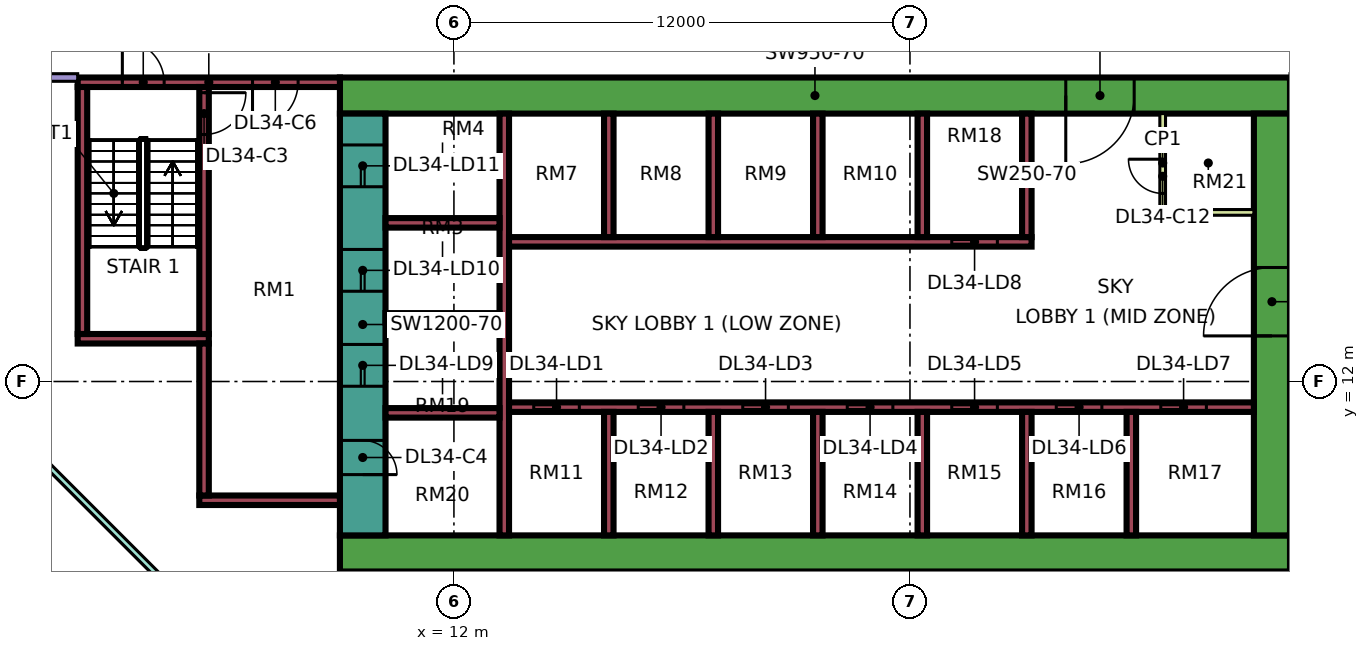
"""IFC4 building model, lengths in metres.
Left out: names, types, materials, properties, quantities, classifications, styles, units other than length and angle.
Written with IfcOpenShell. Run it as: python <this file> out.ifc"""

import sys

from ifc_helpers import new_model, si_unit, direction, frame, frame_2d, origin, place, context, subcontext, project, spatial, rectangle, extrude, element, fill, save


model = new_model("IFC4")
c1 = context("Model", 3, precision=1e-05, world=origin(), true_north=direction((0.0, 1.0)))
c2 = subcontext(c1, "Body", "Model", "MODEL_VIEW")
j1 = project(units=[si_unit("LENGTHUNIT", "METRE"), si_unit("PLANEANGLEUNIT", "RADIAN")], contexts=[c1])
p1 = place(None, origin())
s1 = spatial("IfcSite", under=j1, at=p1, CompositionType="ELEMENT")
p2 = place(p1, origin())
s2 = spatial("IfcBuilding", under=s1, at=p2, CompositionType="ELEMENT")
p3 = place(p2, frame((0.0, 0.0, 146.15)))
s3 = spatial("IfcBuildingStorey", under=s2, at=p3, CompositionType="ELEMENT", Elevation=146.15)
p4 = place(p3, frame((9.0, 7.475, 0.0), z_axis=(0.0, 0.0, 1.0), x_axis=(1.0, 0.0, 0.0)))
e1 = element("IfcWall", 1, at=p4, inside=s3, PredefinedType="SHEAR", context=c2, shape_type="SweptSolid", body=[
    extrude(rectangle(XDim=25.0, YDim=0.95, at=frame_2d((12.5, 0.0))), origin(), (0.0, 0.0, 1.0), 11.25),
])
p5 = place(p3, frame((9.0, 19.525, 0.0), z_axis=(0.0, 0.0, 1.0), x_axis=(1.0, 0.0, 0.0)))
e2 = element("IfcWall", 2, at=p5, inside=s3, PredefinedType="SHEAR", context=c2, shape_type="SweptSolid", body=[
    extrude(rectangle(XDim=25.0, YDim=0.95, at=frame_2d((12.5, 0.0))), origin(), (0.0, 0.0, 1.0), 11.25),
])
p6 = place(p5, frame((19.1, 0.0, 0.0)))
e3 = element("IfcOpeningElement", 3, at=p6, cuts=e2, PredefinedType="OPENING", context=c2, shape_type="SweptSolid", body=[
    extrude(rectangle(XDim=1.8, YDim=2.4, at=frame_2d((0.9, 1.2))), frame((0.0, 0.485, 0.0), z_axis=(0.0, -1.0, 0.0), x_axis=(1.0, 0.0, 0.0)), (0.0, 0.0, 1.0), 0.97),
])
p7 = place(p3, frame((9.6, 7.95, 0.0), z_axis=(0.0, 0.0, 1.0), x_axis=(0.0, 1.0, 0.0)))
e4 = element("IfcWall", 4, at=p7, inside=s3, PredefinedType="SHEAR", context=c2, shape_type="SweptSolid", body=[
    extrude(rectangle(XDim=11.1, YDim=1.2, at=frame_2d((5.55, 0.0))), origin(), (0.0, 0.0, 1.0), 11.25),
])
p8 = place(p7, frame((3.925, 0.0, 0.0)))
e5 = element("IfcOpeningElement", 5, at=p8, cuts=e4, PredefinedType="OPENING", context=c2, shape_type="SweptSolid", body=[
    extrude(rectangle(XDim=1.1, YDim=2.2, at=frame_2d((0.55, 1.1))), frame((0.0, 0.61, 0.0), z_axis=(0.0, -1.0, 0.0), x_axis=(1.0, 0.0, 0.0)), (0.0, 0.0, 1.0), 1.22),
])
p9 = place(p7, frame((6.425, 0.0, 0.0)))
e6 = element("IfcOpeningElement", 6, at=p9, cuts=e4, PredefinedType="OPENING", context=c2, shape_type="SweptSolid", body=[
    extrude(rectangle(XDim=1.1, YDim=2.2, at=frame_2d((0.55, 1.1))), frame((0.0, 0.61, 0.0), z_axis=(0.0, -1.0, 0.0), x_axis=(1.0, 0.0, 0.0)), (0.0, 0.0, 1.0), 1.22),
])
p10 = place(p7, frame((9.175, 0.0, 0.0)))
e7 = element("IfcOpeningElement", 7, at=p10, cuts=e4, PredefinedType="OPENING", context=c2, shape_type="SweptSolid", body=[
    extrude(rectangle(XDim=1.1, YDim=2.2, at=frame_2d((0.55, 1.1))), frame((0.0, 0.61, 0.0), z_axis=(0.0, -1.0, 0.0), x_axis=(1.0, 0.0, 0.0)), (0.0, 0.0, 1.0), 1.22),
])
p11 = place(p7, frame((1.6, 0.0, 0.0)))
e8 = element("IfcOpeningElement", 8, at=p11, cuts=e4, PredefinedType="OPENING", context=c2, shape_type="SweptSolid", body=[
    extrude(rectangle(XDim=0.9, YDim=2.1, at=frame_2d((0.45, 1.05))), frame((0.0, 0.61, 0.0), z_axis=(0.0, -1.0, 0.0), x_axis=(1.0, 0.0, 0.0)), (0.0, 0.0, 1.0), 1.22),
])
p12 = place(p3, frame((33.525, 7.95, 0.0), z_axis=(0.0, 0.0, 1.0), x_axis=(0.0, 1.0, 0.0)))
e9 = element("IfcWall", 9, at=p12, inside=s3, PredefinedType="SHEAR", context=c2, shape_type="SweptSolid", body=[
    extrude(rectangle(XDim=11.1, YDim=0.95, at=frame_2d((5.55, 0.0))), origin(), (0.0, 0.0, 1.0), 11.25),
])
p13 = place(p12, frame((5.25, 0.0, 0.0)))
e10 = element("IfcOpeningElement", 10, at=p13, cuts=e9, PredefinedType="OPENING", context=c2, shape_type="SweptSolid", body=[
    extrude(rectangle(XDim=1.8, YDim=2.4, at=frame_2d((0.9, 1.2))), frame((0.0, 0.485, 0.0), z_axis=(0.0, -1.0, 0.0), x_axis=(1.0, 0.0, 0.0)), (0.0, 0.0, 1.0), 0.97),
])
p14 = place(p3, frame((13.325, 7.95, 0.0), z_axis=(0.0, 0.0, 1.0), x_axis=(0.0, 1.0, 0.0)))
e11 = element("IfcWall", 11, at=p14, inside=s3, PredefinedType="SHEAR", context=c2, shape_type="SweptSolid", body=[
    extrude(rectangle(XDim=11.1, YDim=0.25, at=frame_2d((5.55, 0.0))), origin(), (0.0, 0.0, 1.0), 11.25),
])
p15 = place(p3, frame((13.45, 11.325, 0.0), z_axis=(0.0, 0.0, 1.0), x_axis=(1.0, 0.0, 0.0)))
e12 = element("IfcWall", 12, at=p15, inside=s3, PredefinedType="SHEAR", context=c2, shape_type="SweptSolid", body=[
    extrude(rectangle(XDim=19.6, YDim=0.25, at=frame_2d((9.8, 0.0))), origin(), (0.0, 0.0, 1.0), 11.25),
])
p16 = place(p15, frame((0.65, 0.0, 0.0)))
e13 = element("IfcOpeningElement", 13, at=p16, cuts=e12, PredefinedType="OPENING", context=c2, shape_type="SweptSolid", body=[
    extrude(rectangle(XDim=1.2, YDim=2.2, at=frame_2d((0.6, 1.1))), frame((0.0, 0.135, 0.0), z_axis=(0.0, -1.0, 0.0), x_axis=(1.0, 0.0, 0.0)), (0.0, 0.0, 1.0), 0.27),
])
p17 = place(p15, frame((3.4, 0.0, 0.0)))
e14 = element("IfcOpeningElement", 14, at=p17, cuts=e12, PredefinedType="OPENING", context=c2, shape_type="SweptSolid", body=[
    extrude(rectangle(XDim=1.2, YDim=2.2, at=frame_2d((0.6, 1.1))), frame((0.0, 0.135, 0.0), z_axis=(0.0, -1.0, 0.0), x_axis=(1.0, 0.0, 0.0)), (0.0, 0.0, 1.0), 0.27),
])
p18 = place(p15, frame((6.15, 0.0, 0.0)))
e15 = element("IfcOpeningElement", 15, at=p18, cuts=e12, PredefinedType="OPENING", context=c2, shape_type="SweptSolid", body=[
    extrude(rectangle(XDim=1.2, YDim=2.2, at=frame_2d((0.6, 1.1))), frame((0.0, 0.135, 0.0), z_axis=(0.0, -1.0, 0.0), x_axis=(1.0, 0.0, 0.0)), (0.0, 0.0, 1.0), 0.27),
])
p19 = place(p15, frame((8.9, 0.0, 0.0)))
e16 = element("IfcOpeningElement", 16, at=p19, cuts=e12, PredefinedType="OPENING", context=c2, shape_type="SweptSolid", body=[
    extrude(rectangle(XDim=1.2, YDim=2.2, at=frame_2d((0.6, 1.1))), frame((0.0, 0.135, 0.0), z_axis=(0.0, -1.0, 0.0), x_axis=(1.0, 0.0, 0.0)), (0.0, 0.0, 1.0), 0.27),
])
p20 = place(p15, frame((11.65, 0.0, 0.0)))
e17 = element("IfcOpeningElement", 17, at=p20, cuts=e12, PredefinedType="OPENING", context=c2, shape_type="SweptSolid", body=[
    extrude(rectangle(XDim=1.2, YDim=2.2, at=frame_2d((0.6, 1.1))), frame((0.0, 0.135, 0.0), z_axis=(0.0, -1.0, 0.0), x_axis=(1.0, 0.0, 0.0)), (0.0, 0.0, 1.0), 0.27),
])
p21 = place(p15, frame((14.4, 0.0, 0.0)))
e18 = element("IfcOpeningElement", 18, at=p21, cuts=e12, PredefinedType="OPENING", context=c2, shape_type="SweptSolid", body=[
    extrude(rectangle(XDim=1.2, YDim=2.2, at=frame_2d((0.6, 1.1))), frame((0.0, 0.135, 0.0), z_axis=(0.0, -1.0, 0.0), x_axis=(1.0, 0.0, 0.0)), (0.0, 0.0, 1.0), 0.27),
])
p22 = place(p15, frame((17.15, 0.0, 0.0)))
e19 = element("IfcOpeningElement", 19, at=p22, cuts=e12, PredefinedType="OPENING", context=c2, shape_type="SweptSolid", body=[
    extrude(rectangle(XDim=1.2, YDim=2.2, at=frame_2d((0.6, 1.1))), frame((0.0, 0.135, 0.0), z_axis=(0.0, -1.0, 0.0), x_axis=(1.0, 0.0, 0.0)), (0.0, 0.0, 1.0), 0.27),
])
p23 = place(p3, frame((13.45, 15.675, 0.0), z_axis=(0.0, 0.0, 1.0), x_axis=(1.0, 0.0, 0.0)))
e20 = element("IfcWall", 20, at=p23, inside=s3, PredefinedType="SHEAR", context=c2, shape_type="SweptSolid", body=[
    extrude(rectangle(XDim=13.75, YDim=0.25, at=frame_2d((6.875, 0.0))), origin(), (0.0, 0.0, 1.0), 11.25),
])
p24 = place(p23, frame((11.65, 0.0, 0.0)))
e21 = element("IfcOpeningElement", 21, at=p24, cuts=e20, PredefinedType="OPENING", context=c2, shape_type="SweptSolid", body=[
    extrude(rectangle(XDim=1.2, YDim=2.2, at=frame_2d((0.6, 1.1))), frame((0.0, 0.135, 0.0), z_axis=(0.0, -1.0, 0.0), x_axis=(1.0, 0.0, 0.0)), (0.0, 0.0, 1.0), 0.27),
])
for number, where, z_axis, x_axis in (
    (22, (10.2, 11.175, 0.0), (0.0, 0.0, 1.0), (1.0, 0.0, 0.0)),
    (23, (10.2, 13.675, 0.0), (0.0, 0.0, 1.0), (1.0, 0.0, 0.0)),
    (24, (10.2, 16.175, 0.0), (0.0, 0.0, 1.0), (1.0, 0.0, 0.0)),
):
    element("IfcWall", number, at=place(p3, frame(where, z_axis=z_axis, x_axis=x_axis)), inside=s3, PredefinedType="SHEAR", context=c2, shape_type="SweptSolid", body=[
        extrude(rectangle(XDim=3.0, YDim=0.25, at=frame_2d((1.5, 0.0))), origin(), (0.0, 0.0, 1.0), 11.25),
    ])
for number, where, z_axis, x_axis in (
    (25, (16.075, 7.95, 0.0), (0.0, 0.0, 1.0), (0.0, 1.0, 0.0)),
    (26, (18.825, 7.95, 0.0), (0.0, 0.0, 1.0), (0.0, 1.0, 0.0)),
    (27, (21.575, 7.95, 0.0), (0.0, 0.0, 1.0), (0.0, 1.0, 0.0)),
    (28, (24.325, 7.95, 0.0), (0.0, 0.0, 1.0), (0.0, 1.0, 0.0)),
    (29, (27.075, 7.95, 0.0), (0.0, 0.0, 1.0), (0.0, 1.0, 0.0)),
    (30, (29.825, 7.95, 0.0), (0.0, 0.0, 1.0), (0.0, 1.0, 0.0)),
    (31, (16.075, 15.8, 0.0), (0.0, 0.0, 1.0), (0.0, 1.0, 0.0)),
    (32, (18.825, 15.8, 0.0), (0.0, 0.0, 1.0), (0.0, 1.0, 0.0)),
    (33, (21.575, 15.8, 0.0), (0.0, 0.0, 1.0), (0.0, 1.0, 0.0)),
    (34, (24.325, 15.8, 0.0), (0.0, 0.0, 1.0), (0.0, 1.0, 0.0)),
    (35, (27.075, 15.8, 0.0), (0.0, 0.0, 1.0), (0.0, 1.0, 0.0)),
):
    element("IfcWall", number, at=place(p3, frame(where, z_axis=z_axis, x_axis=x_axis)), inside=s3, PredefinedType="SHEAR", context=c2, shape_type="SweptSolid", body=[
        extrude(rectangle(XDim=3.25, YDim=0.25, at=frame_2d((1.625, 0.0))), origin(), (0.0, 0.0, 1.0), 11.25),
    ])
p25 = place(p3, frame((2.1, 19.875, 0.0), z_axis=(0.0, 0.0, 1.0), x_axis=(1.0, 0.0, 0.0)))
e36 = element("IfcWall", 36, at=p25, inside=s3, PredefinedType="SHEAR", context=c2, shape_type="SweptSolid", body=[
    extrude(rectangle(XDim=6.9, YDim=0.25, at=frame_2d((3.45, 0.0))), origin(), (0.0, 0.0, 1.0), 11.25),
])
p26 = place(p25, frame((1.175, 0.0, 0.0)))
e37 = element("IfcOpeningElement", 37, at=p26, cuts=e36, PredefinedType="OPENING", context=c2, shape_type="SweptSolid", body=[
    extrude(rectangle(XDim=1.1, YDim=2.2, at=frame_2d((0.55, 1.1))), frame((0.0, 0.135, 0.0), z_axis=(0.0, -1.0, 0.0), x_axis=(1.0, 0.0, 0.0)), (0.0, 0.0, 1.0), 0.27),
])
p27 = place(p25, frame((4.6, 0.0, 0.0)))
e38 = element("IfcOpeningElement", 38, at=p27, cuts=e36, PredefinedType="OPENING", context=c2, shape_type="SweptSolid", body=[
    extrude(rectangle(XDim=1.2, YDim=2.2, at=frame_2d((0.6, 1.1))), frame((0.0, 0.135, 0.0), z_axis=(0.0, -1.0, 0.0), x_axis=(1.0, 0.0, 0.0)), (0.0, 0.0, 1.0), 0.27),
])
p28 = place(p3, frame((2.1, 13.125, 0.0), z_axis=(0.0, 0.0, 1.0), x_axis=(1.0, 0.0, 0.0)))
e39 = element("IfcWall", 39, at=p28, inside=s3, PredefinedType="SHEAR", context=c2, shape_type="SweptSolid", body=[
    extrude(rectangle(XDim=3.45, YDim=0.25, at=frame_2d((1.725, 0.0))), origin(), (0.0, 0.0, 1.0), 11.25),
])
p29 = place(p3, frame((2.225, 13.25, 0.0), z_axis=(0.0, 0.0, 1.0), x_axis=(0.0, 1.0, 0.0)))
e40 = element("IfcWall", 40, at=p29, inside=s3, PredefinedType="SHEAR", context=c2, shape_type="SweptSolid", body=[
    extrude(rectangle(XDim=6.5, YDim=0.25, at=frame_2d((3.25, 0.0))), origin(), (0.0, 0.0, 1.0), 11.25),
])
p30 = place(p3, frame((5.425, 13.25, 0.0), z_axis=(0.0, 0.0, 1.0), x_axis=(0.0, 1.0, 0.0)))
e41 = element("IfcWall", 41, at=p30, inside=s3, PredefinedType="SHEAR", context=c2, shape_type="SweptSolid", body=[
    extrude(rectangle(XDim=6.5, YDim=0.25, at=frame_2d((3.25, 0.0))), origin(), (0.0, 0.0, 1.0), 11.25),
])
p31 = place(p30, frame((5.25, 0.0, 0.0)))
e42 = element("IfcOpeningElement", 42, at=p31, cuts=e41, PredefinedType="OPENING", context=c2, shape_type="SweptSolid", body=[
    extrude(rectangle(XDim=1.1, YDim=2.2, at=frame_2d((0.55, 1.1))), frame((0.0, 0.135, 0.0), z_axis=(0.0, -1.0, 0.0), x_axis=(1.0, 0.0, 0.0)), (0.0, 0.0, 1.0), 0.27),
])
p32 = place(p3, frame((5.3, 8.875, 0.0), z_axis=(0.0, 0.0, 1.0), x_axis=(1.0, 0.0, 0.0)))
e43 = element("IfcWall", 43, at=p32, inside=s3, PredefinedType="SHEAR", context=c2, shape_type="SweptSolid", body=[
    extrude(rectangle(XDim=3.7, YDim=0.25, at=frame_2d((1.85, 0.0))), origin(), (0.0, 0.0, 1.0), 11.25),
])
p33 = place(p3, frame((5.425, 9.0, 0.0), z_axis=(0.0, 0.0, 1.0), x_axis=(0.0, 1.0, 0.0)))
e44 = element("IfcWall", 44, at=p33, inside=s3, PredefinedType="SHEAR", context=c2, shape_type="SweptSolid", body=[
    extrude(rectangle(XDim=4.0, YDim=0.25, at=frame_2d((2.0, 0.0))), origin(), (0.0, 0.0, 1.0), 11.25),
])
p34 = place(p3, frame((-1.447, 12.553, 0.0), z_axis=(0.0, 0.0, 1.0), x_axis=(0.707106781187, -0.707106781187, 0.0)))
e45 = element("IfcWall", 45, at=p34, inside=s3, PredefinedType="SOLIDWALL", context=c2, shape_type="SweptSolid", body=[
    extrude(rectangle(XDim=19.799, YDim=0.15, at=frame_2d((9.899, 0.0))), origin(), (0.0, 0.0, 1.0), 10.85),
])
p35 = place(p34, frame((8.399, 0.0, 0.45)))
e46 = element("IfcOpeningElement", 46, at=p35, cuts=e45, PredefinedType="OPENING", context=c2, shape_type="SweptSolid", body=[
    extrude(rectangle(XDim=3.0, YDim=9.8, at=frame_2d((1.5, 4.9))), frame((0.0, 0.085, 0.0), z_axis=(0.0, -1.0, 0.0), x_axis=(1.0, 0.0, 0.0)), (0.0, 0.0, 1.0), 0.17),
])
p36 = place(p3, frame((30.65, 16.45, 0.0), z_axis=(0.0, 0.0, 1.0), x_axis=(0.0, 1.0, 0.0)))
e47 = element("IfcWall", 47, at=p36, inside=s3, PredefinedType="PARTITIONING", context=c2, shape_type="SweptSolid", body=[
    extrude(rectangle(XDim=2.6, YDim=0.15, at=frame_2d((1.3, 0.0))), origin(), (0.0, 0.0, 1.0), 10.85),
])
p37 = place(p36, frame((0.5, 0.0, 0.0)))
e48 = element("IfcOpeningElement", 48, at=p37, cuts=e47, PredefinedType="OPENING", context=c2, shape_type="SweptSolid", body=[
    extrude(rectangle(XDim=0.9, YDim=2.1, at=frame_2d((0.45, 1.05))), frame((0.0, 0.085, 0.0), z_axis=(0.0, -1.0, 0.0), x_axis=(1.0, 0.0, 0.0)), (0.0, 0.0, 1.0), 0.17),
])
p38 = place(p3, frame((30.65, 16.45, 0.0), z_axis=(0.0, 0.0, 1.0), x_axis=(1.0, 0.0, 0.0)))
e49 = element("IfcWall", 49, at=p38, inside=s3, PredefinedType="PARTITIONING", context=c2, shape_type="SweptSolid", body=[
    extrude(rectangle(XDim=2.4, YDim=0.15, at=frame_2d((1.2, 0.0))), origin(), (0.0, 0.0, 1.0), 10.85),
])
p39 = place(p3, frame((0.074, 20.0, 0.0), z_axis=(0.0, 0.0, 1.0), x_axis=(1.0, 0.0, 0.0)))
e50 = element("IfcWall", 50, at=p39, inside=s3, PredefinedType="PARTITIONING", context=c2, shape_type="SweptSolid", body=[
    extrude(rectangle(XDim=2.026, YDim=0.2, at=frame_2d((1.013, 0.0))), origin(), (0.0, 0.0, 1.0), 10.85),
])
p40 = place(p16, origin())
e51 = element("IfcDoor", 51, at=p40, inside=s3, OperationType="DOUBLE_DOOR_SLIDING", PredefinedType="DOOR", context=c2, shape_type="SweptSolid", body=[
    extrude(rectangle(XDim=1.2, YDim=2.2, at=frame_2d((0.6, 1.1))), frame((0.0, 0.025, 0.0), z_axis=(0.0, -1.0, 0.0), x_axis=(1.0, 0.0, 0.0)), (0.0, 0.0, 1.0), 0.05),
])
fill(e13, e51)
p41 = place(p17, origin())
e52 = element("IfcDoor", 52, at=p41, inside=s3, OperationType="DOUBLE_DOOR_SLIDING", PredefinedType="DOOR", context=c2, shape_type="SweptSolid", body=[
    extrude(rectangle(XDim=1.2, YDim=2.2, at=frame_2d((0.6, 1.1))), frame((0.0, 0.025, 0.0), z_axis=(0.0, -1.0, 0.0), x_axis=(1.0, 0.0, 0.0)), (0.0, 0.0, 1.0), 0.05),
])
fill(e14, e52)
p42 = place(p18, origin())
e53 = element("IfcDoor", 53, at=p42, inside=s3, OperationType="DOUBLE_DOOR_SLIDING", PredefinedType="DOOR", context=c2, shape_type="SweptSolid", body=[
    extrude(rectangle(XDim=1.2, YDim=2.2, at=frame_2d((0.6, 1.1))), frame((0.0, 0.025, 0.0), z_axis=(0.0, -1.0, 0.0), x_axis=(1.0, 0.0, 0.0)), (0.0, 0.0, 1.0), 0.05),
])
fill(e15, e53)
p43 = place(p19, origin())
e54 = element("IfcDoor", 54, at=p43, inside=s3, OperationType="DOUBLE_DOOR_SLIDING", PredefinedType="DOOR", context=c2, shape_type="SweptSolid", body=[
    extrude(rectangle(XDim=1.2, YDim=2.2, at=frame_2d((0.6, 1.1))), frame((0.0, 0.025, 0.0), z_axis=(0.0, -1.0, 0.0), x_axis=(1.0, 0.0, 0.0)), (0.0, 0.0, 1.0), 0.05),
])
fill(e16, e54)
p44 = place(p20, origin())
e55 = element("IfcDoor", 55, at=p44, inside=s3, OperationType="DOUBLE_DOOR_SLIDING", PredefinedType="DOOR", context=c2, shape_type="SweptSolid", body=[
    extrude(rectangle(XDim=1.2, YDim=2.2, at=frame_2d((0.6, 1.1))), frame((0.0, 0.025, 0.0), z_axis=(0.0, -1.0, 0.0), x_axis=(1.0, 0.0, 0.0)), (0.0, 0.0, 1.0), 0.05),
])
fill(e17, e55)
p45 = place(p21, origin())
e56 = element("IfcDoor", 56, at=p45, inside=s3, OperationType="DOUBLE_DOOR_SLIDING", PredefinedType="DOOR", context=c2, shape_type="SweptSolid", body=[
    extrude(rectangle(XDim=1.2, YDim=2.2, at=frame_2d((0.6, 1.1))), frame((0.0, 0.025, 0.0), z_axis=(0.0, -1.0, 0.0), x_axis=(1.0, 0.0, 0.0)), (0.0, 0.0, 1.0), 0.05),
])
fill(e18, e56)
p46 = place(p22, origin())
e57 = element("IfcDoor", 57, at=p46, inside=s3, OperationType="DOUBLE_DOOR_SLIDING", PredefinedType="DOOR", context=c2, shape_type="SweptSolid", body=[
    extrude(rectangle(XDim=1.2, YDim=2.2, at=frame_2d((0.6, 1.1))), frame((0.0, 0.025, 0.0), z_axis=(0.0, -1.0, 0.0), x_axis=(1.0, 0.0, 0.0)), (0.0, 0.0, 1.0), 0.05),
])
fill(e19, e57)
p47 = place(p24, origin())
e58 = element("IfcDoor", 58, at=p47, inside=s3, OperationType="DOUBLE_DOOR_SLIDING", PredefinedType="DOOR", context=c2, shape_type="SweptSolid", body=[
    extrude(rectangle(XDim=1.2, YDim=2.2, at=frame_2d((0.6, 1.1))), frame((0.0, 0.025, 0.0), z_axis=(0.0, -1.0, 0.0), x_axis=(1.0, 0.0, 0.0)), (0.0, 0.0, 1.0), 0.05),
])
fill(e21, e58)
p48 = place(p8, origin())
e59 = element("IfcDoor", 59, at=p48, inside=s3, OperationType="DOUBLE_DOOR_SLIDING", PredefinedType="DOOR", context=c2, shape_type="SweptSolid", body=[
    extrude(rectangle(XDim=1.1, YDim=2.2, at=frame_2d((0.55, 1.1))), frame((0.0, 0.025, 0.0), z_axis=(0.0, -1.0, 0.0), x_axis=(1.0, 0.0, 0.0)), (0.0, 0.0, 1.0), 0.05),
])
fill(e5, e59)
p49 = place(p9, origin())
e60 = element("IfcDoor", 60, at=p49, inside=s3, OperationType="DOUBLE_DOOR_SLIDING", PredefinedType="DOOR", context=c2, shape_type="SweptSolid", body=[
    extrude(rectangle(XDim=1.1, YDim=2.2, at=frame_2d((0.55, 1.1))), frame((0.0, 0.025, 0.0), z_axis=(0.0, -1.0, 0.0), x_axis=(1.0, 0.0, 0.0)), (0.0, 0.0, 1.0), 0.05),
])
fill(e6, e60)
p50 = place(p10, origin())
e61 = element("IfcDoor", 61, at=p50, inside=s3, OperationType="DOUBLE_DOOR_SLIDING", PredefinedType="DOOR", context=c2, shape_type="SweptSolid", body=[
    extrude(rectangle(XDim=1.1, YDim=2.2, at=frame_2d((0.55, 1.1))), frame((0.0, 0.025, 0.0), z_axis=(0.0, -1.0, 0.0), x_axis=(1.0, 0.0, 0.0)), (0.0, 0.0, 1.0), 0.05),
])
fill(e7, e61)
p51 = place(p13, origin())
e62 = element("IfcDoor", 62, at=p51, inside=s3, OperationType="DOUBLE_DOOR_SINGLE_SWING", PredefinedType="DOOR", context=c2, shape_type="SweptSolid", body=[
    extrude(rectangle(XDim=1.8, YDim=2.4, at=frame_2d((0.9, 1.2))), frame((0.0, 0.025, 0.0), z_axis=(0.0, -1.0, 0.0), x_axis=(1.0, 0.0, 0.0)), (0.0, 0.0, 1.0), 0.05),
])
fill(e10, e62)
p52 = place(p6, frame((1.8, 0.0, 0.0), z_axis=(0.0, 0.0, 1.0), x_axis=(-1.0, 0.0, 0.0)))
e63 = element("IfcDoor", 63, at=p52, inside=s3, OperationType="DOUBLE_DOOR_SINGLE_SWING", PredefinedType="DOOR", context=c2, shape_type="SweptSolid", body=[
    extrude(rectangle(XDim=1.8, YDim=2.4, at=frame_2d((0.9, 1.2))), frame((0.0, 0.025, 0.0), z_axis=(0.0, -1.0, 0.0), x_axis=(1.0, 0.0, 0.0)), (0.0, 0.0, 1.0), 0.05),
])
fill(e3, e63)
p53 = place(p31, origin())
e64 = element("IfcDoor", 64, at=p53, inside=s3, OperationType="SINGLE_SWING_RIGHT", PredefinedType="DOOR", context=c2, shape_type="SweptSolid", body=[
    extrude(rectangle(XDim=1.1, YDim=2.2, at=frame_2d((0.55, 1.1))), frame((0.0, 0.025, 0.0), z_axis=(0.0, -1.0, 0.0), x_axis=(1.0, 0.0, 0.0)), (0.0, 0.0, 1.0), 0.05),
])
fill(e42, e64)
p54 = place(p11, frame((0.9, 0.0, 0.0), z_axis=(0.0, 0.0, 1.0), x_axis=(-1.0, 0.0, 0.0)))
e65 = element("IfcDoor", 65, at=p54, inside=s3, OperationType="SINGLE_SWING_LEFT", PredefinedType="DOOR", context=c2, shape_type="SweptSolid", body=[
    extrude(rectangle(XDim=0.9, YDim=2.1, at=frame_2d((0.45, 1.05))), frame((0.0, 0.025, 0.0), z_axis=(0.0, -1.0, 0.0), x_axis=(1.0, 0.0, 0.0)), (0.0, 0.0, 1.0), 0.05),
])
fill(e8, e65)
p55 = place(p26, origin())
e66 = element("IfcDoor", 66, at=p55, inside=s3, OperationType="SINGLE_SWING_LEFT", PredefinedType="DOOR", context=c2, shape_type="SweptSolid", body=[
    extrude(rectangle(XDim=1.1, YDim=2.2, at=frame_2d((0.55, 1.1))), frame((0.0, 0.025, 0.0), z_axis=(0.0, -1.0, 0.0), x_axis=(1.0, 0.0, 0.0)), (0.0, 0.0, 1.0), 0.05),
])
fill(e37, e66)
p56 = place(p27, frame((1.2, 0.0, 0.0), z_axis=(0.0, 0.0, 1.0), x_axis=(-1.0, 0.0, 0.0)))
e67 = element("IfcDoor", 67, at=p56, inside=s3, OperationType="SINGLE_SWING_LEFT", PredefinedType="DOOR", context=c2, shape_type="SweptSolid", body=[
    extrude(rectangle(XDim=1.2, YDim=2.2, at=frame_2d((0.6, 1.1))), frame((0.0, 0.025, 0.0), z_axis=(0.0, -1.0, 0.0), x_axis=(1.0, 0.0, 0.0)), (0.0, 0.0, 1.0), 0.05),
])
fill(e38, e67)
p57 = place(p37, frame((0.9, 0.0, 0.0), z_axis=(0.0, 0.0, 1.0), x_axis=(-1.0, 0.0, 0.0)))
e68 = element("IfcDoor", 68, at=p57, inside=s3, OperationType="SINGLE_SWING_RIGHT", PredefinedType="DOOR", context=c2, shape_type="SweptSolid", body=[
    extrude(rectangle(XDim=0.9, YDim=2.1, at=frame_2d((0.45, 1.05))), frame((0.0, 0.025, 0.0), z_axis=(0.0, -1.0, 0.0), x_axis=(1.0, 0.0, 0.0)), (0.0, 0.0, 1.0), 0.05),
])
fill(e48, e68)
save(model, sys.argv[1])
